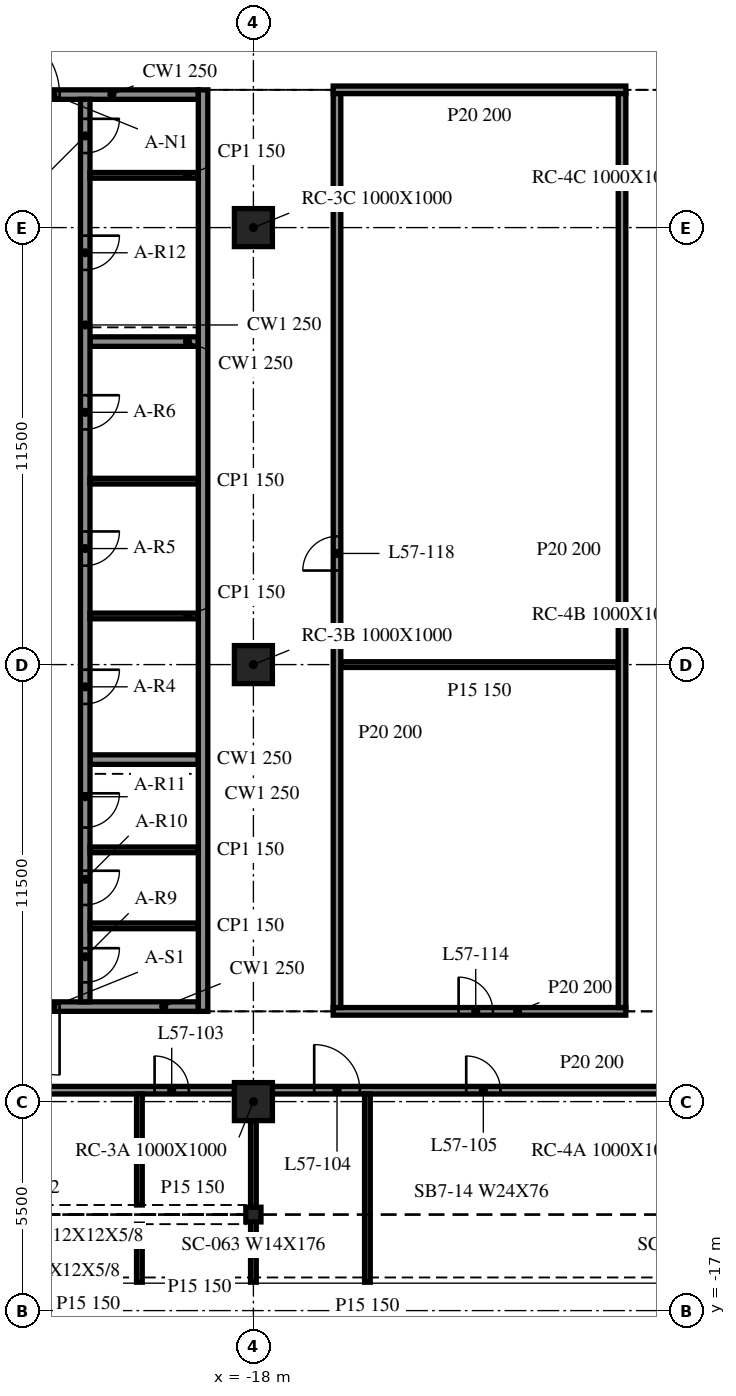
"""IFC4 building model, lengths in metres.
Left out: names, types, materials, properties, quantities, classifications, styles, units other than length and angle.
Written with IfcOpenShell. Run it as: python <this file> out.ifc"""

import sys

from ifc_helpers import new_model, si_unit, direction, frame, frame_2d, origin, origin_2d, place, context, subcontext, project, spatial, rectangle, i_section, extrude, element, fill, save


model = new_model("IFC4")
c1 = context("Model", 3, precision=1e-05, world=origin(), true_north=direction((0.0, 1.0)))
c2 = subcontext(c1, "Body", "Model", "MODEL_VIEW")
j1 = project(units=[si_unit("LENGTHUNIT", "METRE"), si_unit("PLANEANGLEUNIT", "RADIAN")], contexts=[c1])
p1 = place(None, origin())
s1 = spatial("IfcSite", under=j1, at=p1, CompositionType="ELEMENT")
p2 = place(p1, origin())
s2 = spatial("IfcBuilding", under=s1, at=p2, CompositionType="ELEMENT")
p3 = place(p2, frame((0.0, 0.0, 236.2)))
s3 = spatial("IfcBuildingStorey", under=s2, at=p3, CompositionType="ELEMENT", Elevation=236.2)
for number, where, z_axis, x_axis in (
    (1, (-18.0, -11.5, -0.34), (0.0, 0.0, 1.0), (1.0, 0.0, 0.0)),
    (2, (-18.0, 0.0, -0.34), (0.0, 0.0, 1.0), (1.0, 0.0, 0.0)),
    (3, (-18.0, 11.5, -0.34), (0.0, 0.0, 1.0), (1.0, 0.0, 0.0)),
):
    element("IfcColumn", number, at=place(p3, frame(where, z_axis=z_axis, x_axis=x_axis)), inside=s3, PredefinedType="COLUMN", context=c2, shape_type="SweptSolid", body=[
        extrude(rectangle(XDim=1.0, YDim=1.0, at=origin_2d()), origin(), (0.0, 0.0, 1.0), 3.8),
    ])
p4 = place(p3, frame((-18.0, -14.473, -0.34), z_axis=(0.0, 0.0, 1.0), x_axis=(1.0, 0.0, 0.0)))
e4 = element("IfcColumn", 4, at=p4, inside=s3, PredefinedType="COLUMN", context=c2, shape_type="SweptSolid", body=[
    extrude(i_section(OverallWidth=0.399, OverallDepth=0.386, WebThickness=0.021, FlangeThickness=0.033, at=origin_2d()), origin(), (0.0, 0.0, 1.0), 3.8),
])
p5 = place(p3, frame((-19.325, -9.125, 0.0), z_axis=(0.0, 0.0, 1.0), x_axis=(0.0, 1.0, 0.0)))
e5 = element("IfcWall", 5, at=p5, inside=s3, PredefinedType="SOLIDWALL", context=c2, shape_type="SweptSolid", body=[
    extrude(rectangle(XDim=24.25, YDim=0.25, at=frame_2d((12.125, 0.0))), origin(), (0.0, 0.0, 1.0), 3.46),
])
p6 = place(p3, frame((-19.45, -9.0, 0.0), z_axis=(0.0, 0.0, 1.0), x_axis=(-1.0, 0.0, 0.0)))
e6 = element("IfcWall", 6, at=p6, inside=s3, PredefinedType="SOLIDWALL", context=c2, shape_type="SweptSolid", body=[
    extrude(rectangle(XDim=9.1, YDim=0.25, at=frame_2d((4.55, 0.0))), origin(), (0.0, 0.0, 1.0), 3.46),
])
p7 = place(p6, frame((3.65, 0.0, 0.0)))
e7 = element("IfcOpeningElement", 7, at=p7, cuts=e6, PredefinedType="OPENING", context=c2, shape_type="SweptSolid", body=[
    extrude(rectangle(XDim=1.8, YDim=2.1, at=frame_2d((0.9, 1.05))), frame((0.0, 0.135, 0.0), z_axis=(0.0, -1.0, 0.0), x_axis=(1.0, 0.0, 0.0)), (0.0, 0.0, 1.0), 0.27),
])
p8 = place(p3, frame((-28.55, 15.0, 0.0), z_axis=(0.0, 0.0, 1.0), x_axis=(1.0, 0.0, 0.0)))
e8 = element("IfcWall", 8, at=p8, inside=s3, PredefinedType="SOLIDWALL", context=c2, shape_type="SweptSolid", body=[
    extrude(rectangle(XDim=9.1, YDim=0.25, at=frame_2d((4.55, 0.0))), origin(), (0.0, 0.0, 1.0), 3.46),
])
p9 = place(p8, frame((3.65, 0.0, 0.0)))
e9 = element("IfcOpeningElement", 9, at=p9, cuts=e8, PredefinedType="OPENING", context=c2, shape_type="SweptSolid", body=[
    extrude(rectangle(XDim=1.8, YDim=2.1, at=frame_2d((0.9, 1.05))), frame((0.0, 0.135, 0.0), z_axis=(0.0, -1.0, 0.0), x_axis=(1.0, 0.0, 0.0)), (0.0, 0.0, 1.0), 0.27),
])
p10 = place(p3, frame((-22.425, 14.875, 0.0), z_axis=(0.0, 0.0, 1.0), x_axis=(0.0, -1.0, 0.0)))
e10 = element("IfcWall", 10, at=p10, inside=s3, PredefinedType="SOLIDWALL", context=c2, shape_type="SweptSolid", body=[
    extrude(rectangle(XDim=23.75, YDim=0.25, at=frame_2d((11.875, 0.0))), origin(), (0.0, 0.0, 1.0), 3.46),
])
p11 = place(p10, frame((15.01, 0.0, 0.0)))
e11 = element("IfcOpeningElement", 11, at=p11, cuts=e10, PredefinedType="OPENING", context=c2, shape_type="SweptSolid", body=[
    extrude(rectangle(XDim=0.9, YDim=2.1, at=frame_2d((0.45, 1.05))), frame((0.0, 0.135, 0.0), z_axis=(0.0, -1.0, 0.0), x_axis=(1.0, 0.0, 0.0)), (0.0, 0.0, 1.0), 0.27),
])
p12 = place(p10, frame((11.371, 0.0, 0.0)))
e12 = element("IfcOpeningElement", 12, at=p12, cuts=e10, PredefinedType="OPENING", context=c2, shape_type="SweptSolid", body=[
    extrude(rectangle(XDim=0.9, YDim=2.1, at=frame_2d((0.45, 1.05))), frame((0.0, 0.135, 0.0), z_axis=(0.0, -1.0, 0.0), x_axis=(1.0, 0.0, 0.0)), (0.0, 0.0, 1.0), 0.27),
])
p13 = place(p10, frame((7.786, 0.0, 0.0)))
e13 = element("IfcOpeningElement", 13, at=p13, cuts=e10, PredefinedType="OPENING", context=c2, shape_type="SweptSolid", body=[
    extrude(rectangle(XDim=0.9, YDim=2.1, at=frame_2d((0.45, 1.05))), frame((0.0, 0.135, 0.0), z_axis=(0.0, -1.0, 0.0), x_axis=(1.0, 0.0, 0.0)), (0.0, 0.0, 1.0), 0.27),
])
p14 = place(p10, frame((22.337, 0.0, 0.0)))
e14 = element("IfcOpeningElement", 14, at=p14, cuts=e10, PredefinedType="OPENING", context=c2, shape_type="SweptSolid", body=[
    extrude(rectangle(XDim=0.9, YDim=2.1, at=frame_2d((0.45, 1.05))), frame((0.0, 0.135, 0.0), z_axis=(0.0, -1.0, 0.0), x_axis=(1.0, 0.0, 0.0)), (0.0, 0.0, 1.0), 0.27),
])
p15 = place(p10, frame((20.3, 0.0, 0.0)))
e15 = element("IfcOpeningElement", 15, at=p15, cuts=e10, PredefinedType="OPENING", context=c2, shape_type="SweptSolid", body=[
    extrude(rectangle(XDim=0.9, YDim=2.1, at=frame_2d((0.45, 1.05))), frame((0.0, 0.135, 0.0), z_axis=(0.0, -1.0, 0.0), x_axis=(1.0, 0.0, 0.0)), (0.0, 0.0, 1.0), 0.27),
])
p16 = place(p10, frame((18.262, 0.0, 0.0)))
e16 = element("IfcOpeningElement", 16, at=p16, cuts=e10, PredefinedType="OPENING", context=c2, shape_type="SweptSolid", body=[
    extrude(rectangle(XDim=0.9, YDim=2.1, at=frame_2d((0.45, 1.05))), frame((0.0, 0.135, 0.0), z_axis=(0.0, -1.0, 0.0), x_axis=(1.0, 0.0, 0.0)), (0.0, 0.0, 1.0), 0.27),
])
p17 = place(p10, frame((3.587, 0.0, 0.0)))
e17 = element("IfcOpeningElement", 17, at=p17, cuts=e10, PredefinedType="OPENING", context=c2, shape_type="SweptSolid", body=[
    extrude(rectangle(XDim=0.9, YDim=2.1, at=frame_2d((0.45, 1.05))), frame((0.0, 0.135, 0.0), z_axis=(0.0, -1.0, 0.0), x_axis=(1.0, 0.0, 0.0)), (0.0, 0.0, 1.0), 0.27),
])
p18 = place(p10, frame((0.512, 0.0, 0.0)))
e18 = element("IfcOpeningElement", 18, at=p18, cuts=e10, PredefinedType="OPENING", context=c2, shape_type="SweptSolid", body=[
    extrude(rectangle(XDim=0.9, YDim=2.1, at=frame_2d((0.45, 1.05))), frame((0.0, 0.135, 0.0), z_axis=(0.0, -1.0, 0.0), x_axis=(1.0, 0.0, 0.0)), (0.0, 0.0, 1.0), 0.27),
])
for number, where, z_axis, x_axis in (
    (19, (-22.3, -2.5, 0.0), (0.0, 0.0, 1.0), (1.0, 0.0, 0.0)),
    (20, (-22.3, 8.5, 0.0), (0.0, 0.0, 1.0), (1.0, 0.0, 0.0)),
):
    element("IfcWall", number, at=place(p3, frame(where, z_axis=z_axis, x_axis=x_axis)), inside=s3, PredefinedType="SOLIDWALL", context=c2, shape_type="SweptSolid", body=[
        extrude(rectangle(XDim=2.85, YDim=0.25, at=frame_2d((1.425, 0.0))), origin(), (0.0, 0.0, 1.0), 3.46),
    ])
for number, where, z_axis, x_axis in (
    (21, (-22.3, 1.28, 0.0), (0.0, 0.0, 1.0), (1.0, 0.0, 0.0)),
    (22, (-22.3, 4.827, 0.0), (0.0, 0.0, 1.0), (1.0, 0.0, 0.0)),
    (23, (-22.3, -6.875, 0.0), (0.0, 0.0, 1.0), (1.0, 0.0, 0.0)),
    (24, (-22.3, -4.875, 0.0), (0.0, 0.0, 1.0), (1.0, 0.0, 0.0)),
    (25, (-22.3, 12.875, 0.0), (0.0, 0.0, 1.0), (1.0, 0.0, 0.0)),
):
    element("IfcWall", number, at=place(p3, frame(where, z_axis=z_axis, x_axis=x_axis)), inside=s3, PredefinedType="PARTITIONING", context=c2, shape_type="SweptSolid", body=[
        extrude(rectangle(XDim=2.85, YDim=0.15, at=frame_2d((1.425, 0.0))), origin(), (0.0, 0.0, 1.0), 3.46),
    ])
p19 = place(p3, frame((-29.5, -11.2, 0.0), z_axis=(0.0, 0.0, 1.0), x_axis=(1.0, 0.0, 0.0)))
e26 = element("IfcWall", 26, at=p19, inside=s3, PredefinedType="PARTITIONING", context=c2, shape_type="SweptSolid", body=[
    extrude(rectangle(XDim=11.0, YDim=0.2, at=frame_2d((5.5, 0.0))), origin(), (0.0, 0.0, 1.0), 3.46),
])
p20 = place(p19, frame((5.1, 0.0, 0.0)))
e27 = element("IfcOpeningElement", 27, at=p20, cuts=e26, PredefinedType="OPENING", context=c2, shape_type="SweptSolid", body=[
    extrude(rectangle(XDim=0.9, YDim=2.1, at=frame_2d((0.45, 1.05))), frame((0.0, 0.11, 0.0), z_axis=(0.0, -1.0, 0.0), x_axis=(1.0, 0.0, 0.0)), (0.0, 0.0, 1.0), 0.22),
])
p21 = place(p19, frame((8.9, 0.0, 0.0)))
e28 = element("IfcOpeningElement", 28, at=p21, cuts=e26, PredefinedType="OPENING", context=c2, shape_type="SweptSolid", body=[
    extrude(rectangle(XDim=0.9, YDim=2.1, at=frame_2d((0.45, 1.05))), frame((0.0, 0.11, 0.0), z_axis=(0.0, -1.0, 0.0), x_axis=(1.0, 0.0, 0.0)), (0.0, 0.0, 1.0), 0.22),
])
p22 = place(p3, frame((-17.5, -11.2, 0.0), z_axis=(0.0, 0.0, 1.0), x_axis=(1.0, 0.0, 0.0)))
e29 = element("IfcWall", 29, at=p22, inside=s3, PredefinedType="PARTITIONING", context=c2, shape_type="SweptSolid", body=[
    extrude(rectangle(XDim=11.0, YDim=0.2, at=frame_2d((5.5, 0.0))), origin(), (0.0, 0.0, 1.0), 3.46),
])
p23 = place(p22, frame((1.1, 0.0, 0.0)))
e30 = element("IfcOpeningElement", 30, at=p23, cuts=e29, PredefinedType="OPENING", context=c2, shape_type="SweptSolid", body=[
    extrude(rectangle(XDim=1.2, YDim=2.1, at=frame_2d((0.6, 1.05))), frame((0.0, 0.11, 0.0), z_axis=(0.0, -1.0, 0.0), x_axis=(1.0, 0.0, 0.0)), (0.0, 0.0, 1.0), 0.22),
])
p24 = place(p22, frame((5.1, 0.0, 0.0)))
e31 = element("IfcOpeningElement", 31, at=p24, cuts=e29, PredefinedType="OPENING", context=c2, shape_type="SweptSolid", body=[
    extrude(rectangle(XDim=0.9, YDim=2.1, at=frame_2d((0.45, 1.05))), frame((0.0, 0.11, 0.0), z_axis=(0.0, -1.0, 0.0), x_axis=(1.0, 0.0, 0.0)), (0.0, 0.0, 1.0), 0.22),
])
p25 = place(p3, frame((-15.9, -9.125, 0.0), z_axis=(0.0, 0.0, 1.0), x_axis=(1.0, 0.0, 0.0)))
e32 = element("IfcWall", 32, at=p25, inside=s3, PredefinedType="PARTITIONING", context=c2, shape_type="SweptSolid", body=[
    extrude(rectangle(XDim=7.7, YDim=0.2, at=frame_2d((3.85, 0.0))), origin(), (0.0, 0.0, 1.0), 3.46),
])
p26 = place(p25, frame((3.3, 0.0, 0.0)))
e33 = element("IfcOpeningElement", 33, at=p26, cuts=e32, PredefinedType="OPENING", context=c2, shape_type="SweptSolid", body=[
    extrude(rectangle(XDim=0.9, YDim=2.1, at=frame_2d((0.45, 1.05))), frame((0.0, 0.11, 0.0), z_axis=(0.0, -1.0, 0.0), x_axis=(1.0, 0.0, 0.0)), (0.0, 0.0, 1.0), 0.22),
])
p27 = place(p3, frame((-15.7, 0.0, 0.0), z_axis=(0.0, 0.0, 1.0), x_axis=(1.0, 0.0, 0.0)))
e34 = element("IfcWall", 34, at=p27, inside=s3, PredefinedType="PARTITIONING", context=c2, shape_type="SweptSolid", body=[
    extrude(rectangle(XDim=7.3, YDim=0.15, at=frame_2d((3.65, 0.0))), origin(), (0.0, 0.0, 1.0), 3.46),
])
p28 = place(p3, frame((-15.9, 15.125, 0.0), z_axis=(0.0, 0.0, 1.0), x_axis=(1.0, 0.0, 0.0)))
e35 = element("IfcWall", 35, at=p28, inside=s3, PredefinedType="PARTITIONING", context=c2, shape_type="SweptSolid", body=[
    extrude(rectangle(XDim=7.7, YDim=0.2, at=frame_2d((3.85, 0.0))), origin(), (0.0, 0.0, 1.0), 3.46),
])
p29 = place(p3, frame((-21.0, -16.253, 0.0), z_axis=(0.0, 0.0, 1.0), x_axis=(0.0, 1.0, 0.0)))
e36 = element("IfcWall", 36, at=p29, inside=s3, PredefinedType="PARTITIONING", context=c2, shape_type="SweptSolid", body=[
    extrude(rectangle(XDim=1.528, YDim=0.15, at=frame_2d((0.764, 0.0))), origin(), (0.0, 0.0, 1.0), 3.46),
])
p30 = place(p3, frame((-21.0, -14.221, 0.0), z_axis=(0.0, 0.0, 1.0), x_axis=(0.0, 1.0, 0.0)))
e37 = element("IfcWall", 37, at=p30, inside=s3, PredefinedType="PARTITIONING", context=c2, shape_type="SweptSolid", body=[
    extrude(rectangle(XDim=2.921, YDim=0.15, at=frame_2d((1.46, 0.0))), origin(), (0.0, 0.0, 1.0), 3.46),
])
p31 = place(p3, frame((-18.0, -16.253, 0.0), z_axis=(0.0, 0.0, 1.0), x_axis=(0.0, 1.0, 0.0)))
e38 = element("IfcWall", 38, at=p31, inside=s3, PredefinedType="PARTITIONING", context=c2, shape_type="SweptSolid", body=[
    extrude(rectangle(XDim=4.253, YDim=0.15, at=frame_2d((2.126, 0.0))), origin(), (0.0, 0.0, 1.0), 3.46),
])
p32 = place(p3, frame((-15.8, -9.025, 0.0), z_axis=(0.0, 0.0, 1.0), x_axis=(0.0, 1.0, 0.0)))
e39 = element("IfcWall", 39, at=p32, inside=s3, PredefinedType="PARTITIONING", context=c2, shape_type="SweptSolid", body=[
    extrude(rectangle(XDim=24.05, YDim=0.2, at=frame_2d((12.025, 0.0))), origin(), (0.0, 0.0, 1.0), 3.46),
])
p33 = place(p32, frame((11.5, 0.0, 0.0)))
e40 = element("IfcOpeningElement", 40, at=p33, cuts=e39, PredefinedType="OPENING", context=c2, shape_type="SweptSolid", body=[
    extrude(rectangle(XDim=0.9, YDim=2.1, at=frame_2d((0.45, 1.05))), frame((0.0, 0.11, 0.0), z_axis=(0.0, -1.0, 0.0), x_axis=(1.0, 0.0, 0.0)), (0.0, 0.0, 1.0), 0.22),
])
p34 = place(p3, frame((-15.0, -16.253, 0.0), z_axis=(0.0, 0.0, 1.0), x_axis=(0.0, 1.0, 0.0)))
e41 = element("IfcWall", 41, at=p34, inside=s3, PredefinedType="PARTITIONING", context=c2, shape_type="SweptSolid", body=[
    extrude(rectangle(XDim=4.953, YDim=0.15, at=frame_2d((2.477, 0.0))), origin(), (0.0, 0.0, 1.0), 3.46),
])
p35 = place(p3, frame((-8.3, -9.025, 0.0), z_axis=(0.0, 0.0, 1.0), x_axis=(0.0, 1.0, 0.0)))
e42 = element("IfcWall", 42, at=p35, inside=s3, PredefinedType="PARTITIONING", context=c2, shape_type="SweptSolid", body=[
    extrude(rectangle(XDim=24.05, YDim=0.2, at=frame_2d((12.025, 0.0))), origin(), (0.0, 0.0, 1.0), 3.46),
])
p36 = place(p7, origin())
e43 = element("IfcDoor", 43, at=p36, inside=s3, OperationType="DOUBLE_DOOR_SINGLE_SWING", PredefinedType="DOOR", context=c2, shape_type="SweptSolid", body=[
    extrude(rectangle(XDim=1.8, YDim=2.1, at=frame_2d((0.9, 1.05))), frame((0.0, 0.025, 0.0), z_axis=(0.0, -1.0, 0.0), x_axis=(1.0, 0.0, 0.0)), (0.0, 0.0, 1.0), 0.05),
])
fill(e7, e43)
p37 = place(p9, origin())
e44 = element("IfcDoor", 44, at=p37, inside=s3, OperationType="DOUBLE_DOOR_SINGLE_SWING", PredefinedType="DOOR", context=c2, shape_type="SweptSolid", body=[
    extrude(rectangle(XDim=1.8, YDim=2.1, at=frame_2d((0.9, 1.05))), frame((0.0, 0.025, 0.0), z_axis=(0.0, -1.0, 0.0), x_axis=(1.0, 0.0, 0.0)), (0.0, 0.0, 1.0), 0.05),
])
fill(e9, e44)
p38 = place(p11, origin())
e45 = element("IfcDoor", 45, at=p38, inside=s3, OperationType="SINGLE_SWING_RIGHT", PredefinedType="DOOR", context=c2, shape_type="SweptSolid", body=[
    extrude(rectangle(XDim=0.9, YDim=2.1, at=frame_2d((0.45, 1.05))), frame((0.0, 0.025, 0.0), z_axis=(0.0, -1.0, 0.0), x_axis=(1.0, 0.0, 0.0)), (0.0, 0.0, 1.0), 0.05),
])
fill(e11, e45)
p39 = place(p12, origin())
e46 = element("IfcDoor", 46, at=p39, inside=s3, OperationType="SINGLE_SWING_LEFT", PredefinedType="DOOR", context=c2, shape_type="SweptSolid", body=[
    extrude(rectangle(XDim=0.9, YDim=2.1, at=frame_2d((0.45, 1.05))), frame((0.0, 0.025, 0.0), z_axis=(0.0, -1.0, 0.0), x_axis=(1.0, 0.0, 0.0)), (0.0, 0.0, 1.0), 0.05),
])
fill(e12, e46)
p40 = place(p13, origin())
e47 = element("IfcDoor", 47, at=p40, inside=s3, OperationType="SINGLE_SWING_RIGHT", PredefinedType="DOOR", context=c2, shape_type="SweptSolid", body=[
    extrude(rectangle(XDim=0.9, YDim=2.1, at=frame_2d((0.45, 1.05))), frame((0.0, 0.025, 0.0), z_axis=(0.0, -1.0, 0.0), x_axis=(1.0, 0.0, 0.0)), (0.0, 0.0, 1.0), 0.05),
])
fill(e13, e47)
p41 = place(p14, origin())
e48 = element("IfcDoor", 48, at=p41, inside=s3, OperationType="SINGLE_SWING_LEFT", PredefinedType="DOOR", context=c2, shape_type="SweptSolid", body=[
    extrude(rectangle(XDim=0.9, YDim=2.1, at=frame_2d((0.45, 1.05))), frame((0.0, 0.025, 0.0), z_axis=(0.0, -1.0, 0.0), x_axis=(1.0, 0.0, 0.0)), (0.0, 0.0, 1.0), 0.05),
])
fill(e14, e48)
p42 = place(p15, origin())
e49 = element("IfcDoor", 49, at=p42, inside=s3, OperationType="SINGLE_SWING_RIGHT", PredefinedType="DOOR", context=c2, shape_type="SweptSolid", body=[
    extrude(rectangle(XDim=0.9, YDim=2.1, at=frame_2d((0.45, 1.05))), frame((0.0, 0.025, 0.0), z_axis=(0.0, -1.0, 0.0), x_axis=(1.0, 0.0, 0.0)), (0.0, 0.0, 1.0), 0.05),
])
fill(e15, e49)
p43 = place(p16, origin())
e50 = element("IfcDoor", 50, at=p43, inside=s3, OperationType="SINGLE_SWING_LEFT", PredefinedType="DOOR", context=c2, shape_type="SweptSolid", body=[
    extrude(rectangle(XDim=0.9, YDim=2.1, at=frame_2d((0.45, 1.05))), frame((0.0, 0.025, 0.0), z_axis=(0.0, -1.0, 0.0), x_axis=(1.0, 0.0, 0.0)), (0.0, 0.0, 1.0), 0.05),
])
fill(e16, e50)
p44 = place(p17, origin())
e51 = element("IfcDoor", 51, at=p44, inside=s3, OperationType="SINGLE_SWING_RIGHT", PredefinedType="DOOR", context=c2, shape_type="SweptSolid", body=[
    extrude(rectangle(XDim=0.9, YDim=2.1, at=frame_2d((0.45, 1.05))), frame((0.0, 0.025, 0.0), z_axis=(0.0, -1.0, 0.0), x_axis=(1.0, 0.0, 0.0)), (0.0, 0.0, 1.0), 0.05),
])
fill(e17, e51)
p45 = place(p18, origin())
e52 = element("IfcDoor", 52, at=p45, inside=s3, OperationType="SINGLE_SWING_LEFT", PredefinedType="DOOR", context=c2, shape_type="SweptSolid", body=[
    extrude(rectangle(XDim=0.9, YDim=2.1, at=frame_2d((0.45, 1.05))), frame((0.0, 0.025, 0.0), z_axis=(0.0, -1.0, 0.0), x_axis=(1.0, 0.0, 0.0)), (0.0, 0.0, 1.0), 0.05),
])
fill(e18, e52)
p46 = place(p21, origin())
e53 = element("IfcDoor", 53, at=p46, inside=s3, OperationType="SINGLE_SWING_LEFT", PredefinedType="DOOR", context=c2, shape_type="SweptSolid", body=[
    extrude(rectangle(XDim=0.9, YDim=2.1, at=frame_2d((0.45, 1.05))), frame((0.0, 0.025, 0.0), z_axis=(0.0, -1.0, 0.0), x_axis=(1.0, 0.0, 0.0)), (0.0, 0.0, 1.0), 0.05),
])
fill(e28, e53)
p47 = place(p23, origin())
e54 = element("IfcDoor", 54, at=p47, inside=s3, OperationType="SINGLE_SWING_RIGHT", PredefinedType="DOOR", context=c2, shape_type="SweptSolid", body=[
    extrude(rectangle(XDim=1.2, YDim=2.1, at=frame_2d((0.6, 1.05))), frame((0.0, 0.025, 0.0), z_axis=(0.0, -1.0, 0.0), x_axis=(1.0, 0.0, 0.0)), (0.0, 0.0, 1.0), 0.05),
])
fill(e30, e54)
p48 = place(p24, origin())
e55 = element("IfcDoor", 55, at=p48, inside=s3, OperationType="SINGLE_SWING_LEFT", PredefinedType="DOOR", context=c2, shape_type="SweptSolid", body=[
    extrude(rectangle(XDim=0.9, YDim=2.1, at=frame_2d((0.45, 1.05))), frame((0.0, 0.025, 0.0), z_axis=(0.0, -1.0, 0.0), x_axis=(1.0, 0.0, 0.0)), (0.0, 0.0, 1.0), 0.05),
])
fill(e31, e55)
p49 = place(p26, origin())
e56 = element("IfcDoor", 56, at=p49, inside=s3, OperationType="SINGLE_SWING_LEFT", PredefinedType="DOOR", context=c2, shape_type="SweptSolid", body=[
    extrude(rectangle(XDim=0.9, YDim=2.1, at=frame_2d((0.45, 1.05))), frame((0.0, 0.025, 0.0), z_axis=(0.0, -1.0, 0.0), x_axis=(1.0, 0.0, 0.0)), (0.0, 0.0, 1.0), 0.05),
])
fill(e33, e56)
p50 = place(p33, origin())
e57 = element("IfcDoor", 57, at=p50, inside=s3, OperationType="SINGLE_SWING_RIGHT", PredefinedType="DOOR", context=c2, shape_type="SweptSolid", body=[
    extrude(rectangle(XDim=0.9, YDim=2.1, at=frame_2d((0.45, 1.05))), frame((0.0, 0.025, 0.0), z_axis=(0.0, -1.0, 0.0), x_axis=(1.0, 0.0, 0.0)), (0.0, 0.0, 1.0), 0.05),
])
fill(e40, e57)
save(model, sys.argv[1])
